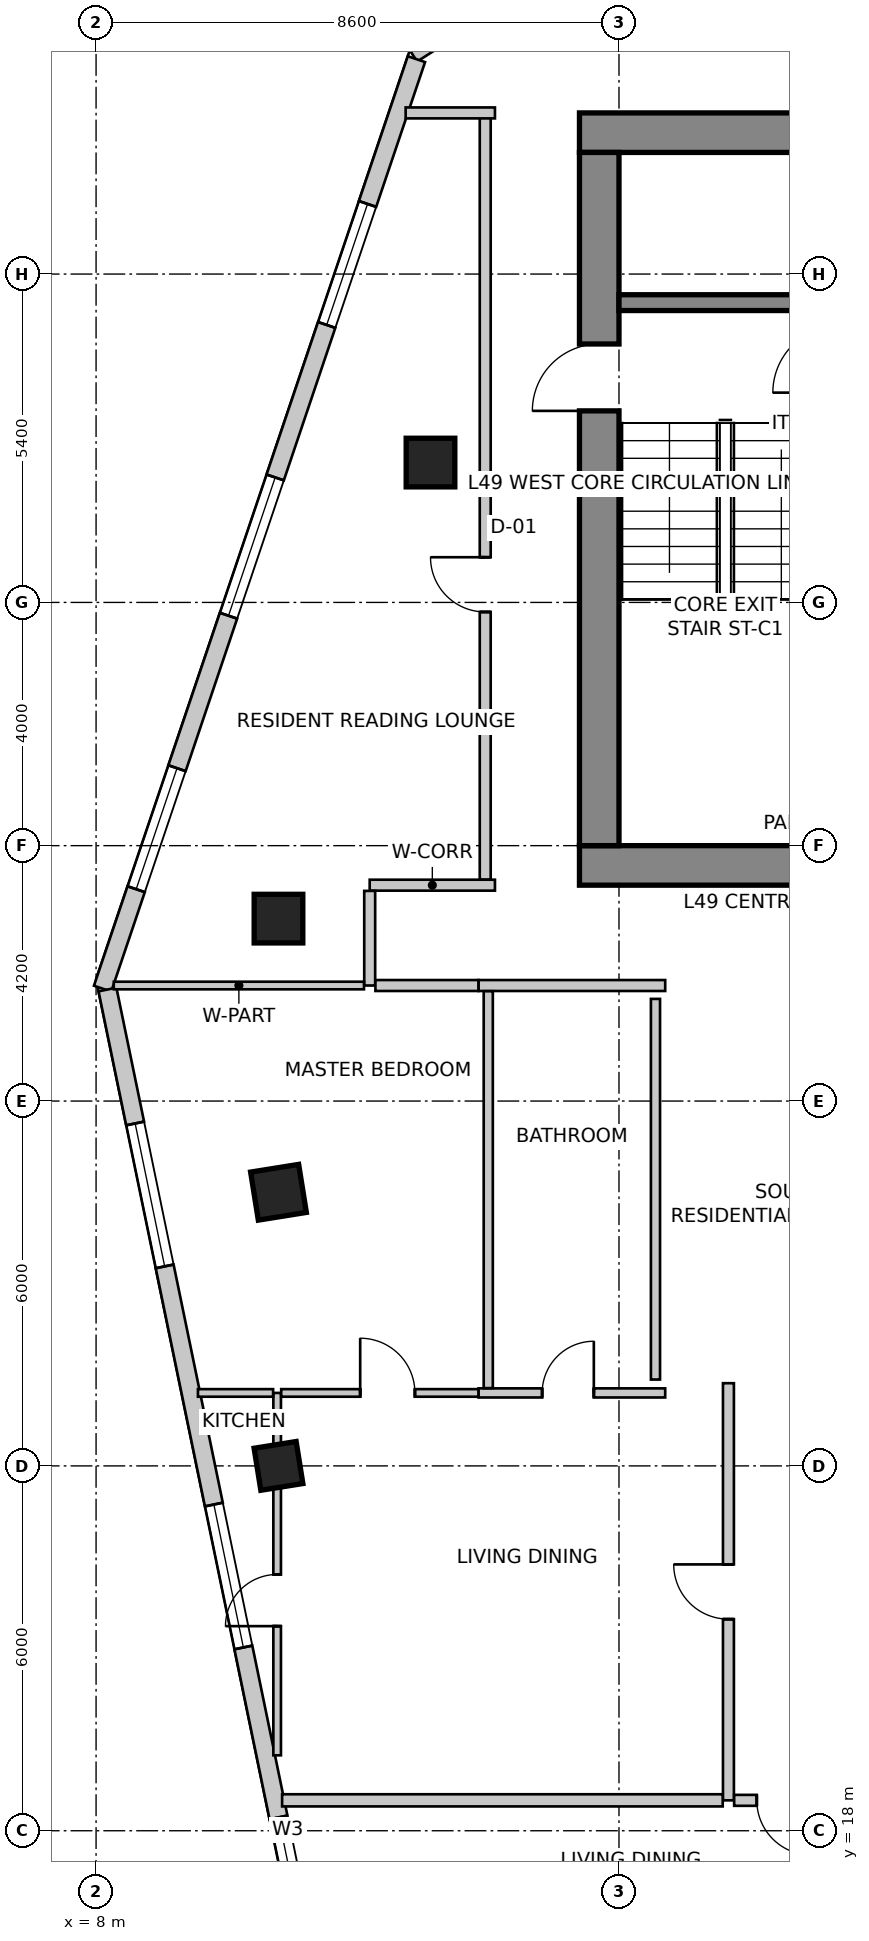
"""IFC4 building model, lengths in metres.
Left out: names, types, materials, properties, quantities, classifications, styles, units other than length and angle.
Written with IfcOpenShell. Run it as: python <this file> out.ifc"""

import sys

from ifc_helpers import new_model, si_unit, direction, frame, frame_2d, origin, origin_2d, place, context, subcontext, project, spatial, rectangle, extrude, source, transform, mapped, element, fill, save


model = new_model("IFC4")
c1 = context("Model", 3, precision=1e-05, world=origin(), true_north=direction((0.0, 1.0)))
c2 = subcontext(c1, "Body", "Model", "MODEL_VIEW")
j1 = project(units=[si_unit("LENGTHUNIT", "METRE"), si_unit("PLANEANGLEUNIT", "RADIAN")], contexts=[c1])
p1 = place(None, origin())
s1 = spatial("IfcSite", under=j1, at=p1, CompositionType="ELEMENT")
p2 = place(p1, origin())
s2 = spatial("IfcBuilding", under=s1, at=p2, CompositionType="ELEMENT")
p3 = place(p2, frame((0.0, 0.0, 197.4)))
s3 = spatial("IfcBuildingStorey", under=s2, at=p3, CompositionType="ELEMENT", Elevation=197.4)
p4 = place(p3, frame((15.95, 45.925, 0.0), z_axis=(0.0, 0.0, 1.0), x_axis=(1.0, 0.0, 0.0)))
e1 = element("IfcWall", 1, at=p4, inside=s3, PredefinedType="SHEAR", context=c2, shape_type="SweptSolid", body=[
    extrude(rectangle(XDim=15.7, YDim=0.65, at=frame_2d((7.85, 0.0))), origin(), (0.0, 0.0, 1.0), 3.5),
])
p5 = place(p3, frame((15.95, 33.875, 0.0), z_axis=(0.0, 0.0, 1.0), x_axis=(1.0, 0.0, 0.0)))
e2 = element("IfcWall", 2, at=p5, inside=s3, PredefinedType="SHEAR", context=c2, shape_type="SweptSolid", body=[
    extrude(rectangle(XDim=15.7, YDim=0.65, at=frame_2d((7.85, 0.0))), origin(), (0.0, 0.0, 1.0), 3.5),
])
m1 = source(origin(), c2, "Body", "SweptSolid", [
    extrude(rectangle(XDim=1.1, YDim=2.15, at=frame_2d((0.55, 1.075))), frame((0.0, 0.335, 0.0), z_axis=(0.0, -1.0, 0.0), x_axis=(1.0, 0.0, 0.0)), (0.0, 0.0, 1.0), 0.67),
])
p6 = place(p5, frame((10.08, 0.0, 0.0)))
e3 = element("IfcOpeningElement", 3, at=p6, cuts=e2, PredefinedType="OPENING", context=c2, shape_type="MappedRepresentation", body=[
    mapped(m1, transform((0.0, 0.0, 0.0), scale=1.0)),
])
p7 = place(p3, frame((16.275, 34.2, 0.0), z_axis=(0.0, 0.0, 1.0), x_axis=(0.0, 1.0, 0.0)))
e4 = element("IfcWall", 4, at=p7, inside=s3, PredefinedType="SHEAR", context=c2, shape_type="SweptSolid", body=[
    extrude(rectangle(XDim=11.4, YDim=0.65, at=frame_2d((5.7, 0.0))), origin(), (0.0, 0.0, 1.0), 3.5),
])
p8 = place(p7, frame((7.15, 0.0, 0.0)))
e5 = element("IfcOpeningElement", 5, at=p8, cuts=e4, PredefinedType="OPENING", context=c2, shape_type="MappedRepresentation", body=[
    mapped(m1, transform((0.0, 0.0, 0.0), scale=1.0)),
])
p9 = place(p3, frame((16.6, 43.13, 0.0), z_axis=(0.0, 0.0, 1.0), x_axis=(1.0, 0.0, 0.0)))
e6 = element("IfcWall", 6, at=p9, inside=s3, PredefinedType="SHEAR", context=c2, shape_type="SweptSolid", body=[
    extrude(rectangle(XDim=3.5, YDim=0.26, at=frame_2d((1.75, 0.0))), origin(), (0.0, 0.0, 1.0), 3.5),
])
m2 = source(origin(), c2, "Body", "SweptSolid", [
    extrude(rectangle(XDim=0.8, YDim=0.8, at=origin_2d()), origin(), (0.0, 0.0, 1.0), 3.5),
])
for number, where, z_axis, x_axis in (
    (7, (11.0, 33.0, 0.0), (0.0, 0.0, 1.0), (1.0, 0.0, 0.0)),
    (8, (13.5, 40.5, 0.0), (0.0, 0.0, 1.0), (1.0, 0.0, 0.0)),
    (9, (11.0, 28.5, 0.0), (0.0, 0.0, 1.0), (0.158, -0.987, 0.0)),
):
    element("IfcColumn", number, at=place(p3, frame(where, z_axis=z_axis, x_axis=x_axis)), inside=s3, PredefinedType="COLUMN", context=c2, shape_type="MappedRepresentation", body=[
        mapped(m2, transform((0.0, 0.0, 0.0), scale=1.0)),
    ])
m3 = source(origin(), c2, "Body", "SweptSolid", [
    extrude(rectangle(XDim=0.7, YDim=0.7, at=origin_2d()), origin(), (0.0, 0.0, 1.0), 3.5),
])
p10 = place(p3, frame((11.0, 24.0, 0.0), z_axis=(0.0, 0.0, 1.0), x_axis=(0.158158067254, -0.987413806751, 0.0)))
e10 = element("IfcColumn", 10, at=p10, inside=s3, PredefinedType="COLUMN", context=c2, shape_type="MappedRepresentation", body=[
    mapped(m3, transform((0.0, 0.0, 0.0), scale=1.0)),
])
p11 = place(p3, frame((21.875, 52.742, 0.0), z_axis=(0.0, 0.0, 1.0), x_axis=(-0.843666375448, -0.536867811419, 0.0)))
e11 = element("IfcWall", 11, at=p11, inside=s3, PredefinedType="SOLIDWALL", context=c2, shape_type="SweptSolid", body=[
    extrude(rectangle(XDim=10.284, YDim=0.3, at=frame_2d((5.142, 0.0))), origin(), (0.0, 0.0, 1.0), 3.25),
])
m4 = source(origin(), c2, "Body", "SweptSolid", [
    extrude(rectangle(XDim=2.4, YDim=2.2, at=frame_2d((1.2, 1.1))), frame((0.0, 0.16, 0.0), z_axis=(0.0, -1.0, 0.0), x_axis=(1.0, 0.0, 0.0)), (0.0, 0.0, 1.0), 0.32),
])
p12 = place(p11, frame((3.307, 0.0, 0.85)))
e12 = element("IfcOpeningElement", 12, at=p12, cuts=e11, PredefinedType="OPENING", context=c2, shape_type="MappedRepresentation", body=[
    mapped(m4, transform((0.0, 0.0, 0.0), scale=1.0)),
])
p13 = place(p3, frame((13.269, 47.134, 0.0), z_axis=(0.0, 0.0, 1.0), x_axis=(-0.319920776449, -0.947444297464, 0.0)))
e13 = element("IfcWall", 13, at=p13, inside=s3, PredefinedType="SOLIDWALL", context=c2, shape_type="SweptSolid", body=[
    extrude(rectangle(XDim=16.133, YDim=0.3, at=frame_2d((8.067, 0.0))), origin(), (0.0, 0.0, 1.0), 3.25),
])
m5 = source(origin(), c2, "Body", "SweptSolid", [
    extrude(rectangle(XDim=2.1, YDim=2.0, at=frame_2d((1.05, 1.0))), frame((0.0, 0.16, 0.0), z_axis=(0.0, -1.0, 0.0), x_axis=(1.0, 0.0, 0.0)), (0.0, 0.0, 1.0), 0.32),
])
p14 = place(p13, frame((2.513, 0.0, 0.85)))
e14 = element("IfcOpeningElement", 14, at=p14, cuts=e13, PredefinedType="OPENING", context=c2, shape_type="MappedRepresentation", body=[
    mapped(m5, transform((0.0, 0.0, 0.0), scale=1.0)),
])
p15 = place(p13, frame((7.26, 0.0, 0.85)))
e15 = element("IfcOpeningElement", 15, at=p15, cuts=e13, PredefinedType="OPENING", context=c2, shape_type="MappedRepresentation", body=[
    mapped(m4, transform((0.0, 0.0, 0.0), scale=1.0)),
])
p16 = place(p13, frame((12.307, 0.0, 0.85)))
e16 = element("IfcOpeningElement", 16, at=p16, cuts=e13, PredefinedType="OPENING", context=c2, shape_type="MappedRepresentation", body=[
    mapped(m5, transform((0.0, 0.0, 0.0), scale=1.0)),
])
p17 = place(p3, frame((8.188, 31.834, 0.0), z_axis=(0.0, 0.0, 1.0), x_axis=(0.202303475707, -0.979322880217, 0.0)))
e17 = element("IfcWall", 17, at=p17, inside=s3, PredefinedType="SOLIDWALL", context=c2, shape_type="SweptSolid", body=[
    extrude(rectangle(XDim=15.766, YDim=0.3, at=frame_2d((7.883, 0.0))), origin(), (0.0, 0.0, 1.0), 3.25),
])
p18 = place(p17, frame((2.249, 0.0, 0.85)))
e18 = element("IfcOpeningElement", 18, at=p18, cuts=e17, PredefinedType="OPENING", context=c2, shape_type="MappedRepresentation", body=[
    mapped(m4, transform((0.0, 0.0, 0.0), scale=1.0)),
])
p19 = place(p17, frame((8.648, 0.0, 0.85)))
e19 = element("IfcOpeningElement", 19, at=p19, cuts=e17, PredefinedType="OPENING", context=c2, shape_type="MappedRepresentation", body=[
    mapped(m4, transform((0.0, 0.0, 0.0), scale=1.0)),
])
m6 = source(origin(), c2, "Body", "SweptSolid", [
    extrude(rectangle(XDim=1.5, YDim=1.8, at=frame_2d((0.75, 0.9))), frame((0.0, 0.16, 0.0), z_axis=(0.0, -1.0, 0.0), x_axis=(1.0, 0.0, 0.0)), (0.0, 0.0, 1.0), 0.32),
])
p20 = place(p17, frame((13.902, 0.0, 0.85)))
e20 = element("IfcOpeningElement", 20, at=p20, cuts=e17, PredefinedType="OPENING", context=c2, shape_type="MappedRepresentation", body=[
    mapped(m6, transform((0.0, 0.0, 0.0), scale=1.0)),
])
p21 = place(p3, frame((12.5, 33.55, 0.0), z_axis=(0.0, 0.0, 1.0), x_axis=(1.0, 0.0, 0.0)))
e21 = element("IfcWall", 21, at=p21, inside=s3, PredefinedType="PARTITIONING", context=c2, shape_type="SweptSolid", body=[
    extrude(rectangle(XDim=2.06, YDim=0.18, at=frame_2d((1.03, 0.0))), origin(), (0.0, 0.0, 1.0), 3.25),
])
p22 = place(p3, frame((12.5, 31.9, 0.0), z_axis=(0.0, 0.0, 1.0), x_axis=(0.0, 1.0, 0.0)))
e22 = element("IfcWall", 22, at=p22, inside=s3, PredefinedType="PARTITIONING", context=c2, shape_type="SweptSolid", body=[
    extrude(rectangle(XDim=1.556, YDim=0.18, at=frame_2d((0.778, 0.0))), origin(), (0.0, 0.0, 1.0), 2.919),
])
p23 = place(p3, frame((17.36, 31.9, 0.0), z_axis=(0.0, 0.0, 1.0), x_axis=(-1.0, 0.0, 0.0)))
e23 = element("IfcWall", 23, at=p23, inside=s3, PredefinedType="PARTITIONING", context=c2, shape_type="SweptSolid", body=[
    extrude(rectangle(XDim=3.07, YDim=0.18, at=frame_2d((1.535, 0.0))), origin(), (0.0, 0.0, 1.0), 2.919),
])
p24 = place(p3, frame((14.288, 31.9, 0.0), z_axis=(0.0, 0.0, 1.0), x_axis=(-1.0, 0.0, 0.0)))
e24 = element("IfcWall", 24, at=p24, inside=s3, PredefinedType="PARTITIONING", context=c2, shape_type="SweptSolid", body=[
    extrude(rectangle(XDim=1.694, YDim=0.18, at=frame_2d((0.847, 0.0))), origin(), (0.0, 0.0, 1.0), 2.919),
])
p25 = place(p3, frame((14.4, 33.644, 0.0), z_axis=(0.0, 0.0, 1.0), x_axis=(0.0, 1.0, 0.0)))
e25 = element("IfcWall", 25, at=p25, inside=s3, PredefinedType="PARTITIONING", context=c2, shape_type="SweptSolid", body=[
    extrude(rectangle(XDim=12.606, YDim=0.18, at=frame_2d((6.303, 0.0))), origin(), (0.0, 0.0, 1.0), 3.25),
])
m7 = source(origin(), c2, "Body", "SweptSolid", [
    extrude(rectangle(XDim=0.9, YDim=2.15, at=frame_2d((0.45, 1.075))), frame((0.0, 0.1, 0.0), z_axis=(0.0, -1.0, 0.0), x_axis=(1.0, 0.0, 0.0)), (0.0, 0.0, 1.0), 0.2),
])
p26 = place(p25, frame((4.399, 0.0, 0.0)))
e26 = element("IfcOpeningElement", 26, at=p26, cuts=e25, PredefinedType="OPENING", context=c2, shape_type="MappedRepresentation", body=[
    mapped(m7, transform((0.0, 0.0, 0.0), scale=1.0)),
])
p27 = place(p3, frame((14.56, 46.25, 0.0), z_axis=(0.0, 0.0, 1.0), x_axis=(-1.0, 0.0, 0.0)))
e27 = element("IfcWall", 27, at=p27, inside=s3, PredefinedType="PARTITIONING", context=c2, shape_type="SweptSolid", body=[
    extrude(rectangle(XDim=1.469, YDim=0.18, at=frame_2d((0.734, 0.0))), origin(), (0.0, 0.0, 1.0), 3.25),
])
p28 = place(p3, frame((12.406, 31.9, 0.0), z_axis=(0.0, 0.0, 1.0), x_axis=(-1.0, 0.0, 0.0)))
e28 = element("IfcWall", 28, at=p28, inside=s3, PredefinedType="PARTITIONING", context=c2, shape_type="SweptSolid", body=[
    extrude(rectangle(XDim=4.115, YDim=0.125, at=frame_2d((2.057, 0.0))), origin(), (0.0, 0.0, 1.0), 2.542),
])
p29 = place(p3, frame((18.4, 18.5, 0.0), z_axis=(0.0, 0.0, 1.0), x_axis=(0.0, 1.0, 0.0)))
e29 = element("IfcWall", 29, at=p29, inside=s3, PredefinedType="PARTITIONING", context=c2, shape_type="SweptSolid", body=[
    extrude(rectangle(XDim=6.86, YDim=0.18, at=frame_2d((3.43, 0.0))), origin(), (0.0, 0.0, 1.0), 2.766),
])
p30 = place(p29, frame((2.98, 0.0, 0.0)))
e30 = element("IfcOpeningElement", 30, at=p30, cuts=e29, PredefinedType="OPENING", context=c2, shape_type="MappedRepresentation", body=[
    mapped(m7, transform((0.0, 0.0, 0.0), scale=1.0)),
])
p31 = place(p3, frame((20.2, 18.5, 0.0), z_axis=(0.0, 0.0, 1.0), x_axis=(-1.0, 0.0, 0.0)))
e31 = element("IfcWall", 31, at=p31, inside=s3, PredefinedType="PARTITIONING", context=c2, shape_type="SweptSolid", body=[
    extrude(rectangle(XDim=1.706, YDim=0.18, at=frame_2d((0.853, 0.0))), origin(), (0.0, 0.0, 1.0), 3.25),
])
p32 = place(p31, frame((0.434, 0.0, 0.0)))
e32 = element("IfcOpeningElement", 32, at=p32, cuts=e31, PredefinedType="OPENING", context=c2, shape_type="MappedRepresentation", body=[
    mapped(m7, transform((0.0, 0.0, 0.0), scale=1.0)),
])
p33 = place(p3, frame((10.978, 19.24, 0.0), z_axis=(0.0, 0.0, 1.0), x_axis=(0.0, 1.0, 0.0)))
e33 = element("IfcWall", 33, at=p33, inside=s3, PredefinedType="PARTITIONING", context=c2, shape_type="SweptSolid", body=[
    extrude(rectangle(XDim=5.96, YDim=0.125, at=frame_2d((2.98, 0.0))), origin(), (0.0, 0.0, 1.0), 2.542),
])
m8 = source(origin(), c2, "Body", "SweptSolid", [
    extrude(rectangle(XDim=0.85, YDim=2.15, at=frame_2d((0.425, 1.075))), frame((0.0, 0.073, 0.0), z_axis=(0.0, -1.0, 0.0), x_axis=(1.0, 0.0, 0.0)), (0.0, 0.0, 1.0), 0.145),
])
p34 = place(p33, frame((2.125, 0.0, 0.0)))
e34 = element("IfcOpeningElement", 34, at=p34, cuts=e33, PredefinedType="OPENING", context=c2, shape_type="MappedRepresentation", body=[
    mapped(m8, transform((0.0, 0.0, 0.0), scale=1.0)),
])
p35 = place(p3, frame((14.29, 25.2, 0.0), z_axis=(0.0, 0.0, 1.0), x_axis=(1.0, 0.0, 0.0)))
e35 = element("IfcWall", 35, at=p35, inside=s3, PredefinedType="PARTITIONING", context=c2, shape_type="SweptSolid", body=[
    extrude(rectangle(XDim=3.07, YDim=0.15, at=frame_2d((1.535, 0.0))), origin(), (0.0, 0.0, 1.0), 2.779),
])
m9 = source(origin(), c2, "Body", "SweptSolid", [
    extrude(rectangle(XDim=0.85, YDim=2.15, at=frame_2d((0.425, 1.075))), frame((0.0, 0.085, 0.0), z_axis=(0.0, -1.0, 0.0), x_axis=(1.0, 0.0, 0.0)), (0.0, 0.0, 1.0), 0.17),
])
p36 = place(p35, frame((1.046, 0.0, 0.0)))
e36 = element("IfcOpeningElement", 36, at=p36, cuts=e35, PredefinedType="OPENING", context=c2, shape_type="MappedRepresentation", body=[
    mapped(m9, transform((0.0, 0.0, 0.0), scale=1.0)),
])
p37 = place(p3, frame((11.044, 25.2, 0.0), z_axis=(0.0, 0.0, 1.0), x_axis=(1.0, 0.0, 0.0)))
e37 = element("IfcWall", 37, at=p37, inside=s3, PredefinedType="PARTITIONING", context=c2, shape_type="SweptSolid", body=[
    extrude(rectangle(XDim=3.244, YDim=0.125, at=frame_2d((1.622, 0.0))), origin(), (0.0, 0.0, 1.0), 2.542),
])
m10 = source(origin(), c2, "Body", "SweptSolid", [
    extrude(rectangle(XDim=0.9, YDim=2.15, at=frame_2d((0.45, 1.075))), frame((0.0, 0.073, 0.0), z_axis=(0.0, -1.0, 0.0), x_axis=(1.0, 0.0, 0.0)), (0.0, 0.0, 1.0), 0.145),
])
p38 = place(p37, frame((1.299, 0.0, 0.0)))
e38 = element("IfcOpeningElement", 38, at=p38, cuts=e37, PredefinedType="OPENING", context=c2, shape_type="MappedRepresentation", body=[
    mapped(m10, transform((0.0, 0.0, 0.0), scale=1.0)),
])
p39 = place(p3, frame((18.306, 18.5, 0.0), z_axis=(0.0, 0.0, 1.0), x_axis=(-1.0, 0.0, 0.0)))
e39 = element("IfcWall", 39, at=p39, inside=s3, PredefinedType="PARTITIONING", context=c2, shape_type="SweptSolid", body=[
    extrude(rectangle(XDim=7.246, YDim=0.2, at=frame_2d((3.623, 0.0))), origin(), (0.0, 0.0, 1.0), 3.25),
])
p40 = place(p3, frame((9.675, 25.2, 0.0), z_axis=(0.0, 0.0, 1.0), x_axis=(1.0, 0.0, 0.0)))
e40 = element("IfcWall", 40, at=p40, inside=s3, PredefinedType="PARTITIONING", context=c2, shape_type="SweptSolid", body=[
    extrude(rectangle(XDim=1.236, YDim=0.125, at=frame_2d((0.618, 0.0))), origin(), (0.0, 0.0, 1.0), 2.542),
])
p41 = place(p3, frame((14.45, 25.279, 0.0), z_axis=(0.0, 0.0, 1.0), x_axis=(0.0, 1.0, 0.0)))
e41 = element("IfcWall", 41, at=p41, inside=s3, PredefinedType="PARTITIONING", context=c2, shape_type="SweptSolid", body=[
    extrude(rectangle(XDim=6.527, YDim=0.15, at=frame_2d((3.263, 0.0))), origin(), (0.0, 0.0, 1.0), 2.766),
])
p42 = place(p3, frame((17.2, 31.68, 0.0), z_axis=(0.0, 0.0, 1.0), x_axis=(0.0, -1.0, 0.0)))
e42 = element("IfcWall", 42, at=p42, inside=s3, PredefinedType="PARTITIONING", context=c2, shape_type="SweptSolid", body=[
    extrude(rectangle(XDim=6.26, YDim=0.15, at=frame_2d((3.13, 0.0))), origin(), (0.0, 0.0, 1.0), 2.766),
])
m11 = source(origin(), c2, "Body", "SweptSolid", [
    extrude(rectangle(XDim=2.1, YDim=2.0, at=frame_2d((1.05, 1.0))), frame((0.0, -0.015, 0.0), z_axis=(0.0, -1.0, 0.0), x_axis=(1.0, 0.0, 0.0)), (0.0, 0.0, 1.0), 0.06),
])
p43 = place(p14, origin())
e43 = element("IfcWindow", 43, at=p43, inside=s3, PartitioningType="SINGLE_PANEL", PredefinedType="WINDOW", context=c2, shape_type="MappedRepresentation", body=[
    mapped(m11, transform((0.0, 0.0, 0.0), scale=1.0)),
])
fill(e14, e43)
m12 = source(origin(), c2, "Body", "SweptSolid", [
    extrude(rectangle(XDim=2.4, YDim=2.2, at=frame_2d((1.2, 1.1))), frame((0.0, -0.015, 0.0), z_axis=(0.0, -1.0, 0.0), x_axis=(1.0, 0.0, 0.0)), (0.0, 0.0, 1.0), 0.06),
])
p44 = place(p15, origin())
e44 = element("IfcWindow", 44, at=p44, inside=s3, PartitioningType="SINGLE_PANEL", PredefinedType="WINDOW", context=c2, shape_type="MappedRepresentation", body=[
    mapped(m12, transform((0.0, 0.0, 0.0), scale=1.0)),
])
fill(e15, e44)
p45 = place(p16, origin())
e45 = element("IfcWindow", 45, at=p45, inside=s3, PartitioningType="SINGLE_PANEL", PredefinedType="WINDOW", context=c2, shape_type="MappedRepresentation", body=[
    mapped(m11, transform((0.0, 0.0, 0.0), scale=1.0)),
])
fill(e16, e45)
p46 = place(p18, origin())
e46 = element("IfcWindow", 46, at=p46, inside=s3, PartitioningType="SINGLE_PANEL", PredefinedType="WINDOW", context=c2, shape_type="MappedRepresentation", body=[
    mapped(m12, transform((0.0, 0.0, 0.0), scale=1.0)),
])
fill(e18, e46)
p47 = place(p19, origin())
e47 = element("IfcWindow", 47, at=p47, inside=s3, PartitioningType="SINGLE_PANEL", PredefinedType="WINDOW", context=c2, shape_type="MappedRepresentation", body=[
    mapped(m12, transform((0.0, 0.0, 0.0), scale=1.0)),
])
fill(e19, e47)
m13 = source(origin(), c2, "Body", "SweptSolid", [
    extrude(rectangle(XDim=1.5, YDim=1.8, at=frame_2d((0.75, 0.9))), frame((0.0, -0.015, 0.0), z_axis=(0.0, -1.0, 0.0), x_axis=(1.0, 0.0, 0.0)), (0.0, 0.0, 1.0), 0.06),
])
p48 = place(p20, origin())
e48 = element("IfcWindow", 48, at=p48, inside=s3, PartitioningType="SINGLE_PANEL", PredefinedType="WINDOW", context=c2, shape_type="MappedRepresentation", body=[
    mapped(m13, transform((0.0, 0.0, 0.0), scale=1.0)),
])
fill(e20, e48)
m14 = source(origin(), c2, "Body", "SweptSolid", [
    extrude(rectangle(XDim=1.1, YDim=2.15, at=frame_2d((0.55, 1.075))), frame((0.0, 0.025, 0.0), z_axis=(0.0, -1.0, 0.0), x_axis=(1.0, 0.0, 0.0)), (0.0, 0.0, 1.0), 0.05),
])
p49 = place(p8, origin())
e49 = element("IfcDoor", 49, at=p49, inside=s3, OperationType="SINGLE_SWING_LEFT", PredefinedType="DOOR", context=c2, shape_type="MappedRepresentation", body=[
    mapped(m14, transform((0.0, 0.0, 0.0), scale=1.0)),
])
fill(e5, e49)
m15 = source(origin(), c2, "Body", "SweptSolid", [
    extrude(rectangle(XDim=0.9, YDim=2.15, at=frame_2d((0.45, 1.075))), frame((0.0, 0.025, 0.0), z_axis=(0.0, -1.0, 0.0), x_axis=(1.0, 0.0, 0.0)), (0.0, 0.0, 1.0), 0.05),
])
p50 = place(p26, origin())
e50 = element("IfcDoor", 50, at=p50, inside=s3, OperationType="SINGLE_SWING_RIGHT", PredefinedType="DOOR", context=c2, shape_type="MappedRepresentation", body=[
    mapped(m15, transform((0.0, 0.0, 0.0), scale=1.0)),
])
fill(e26, e50)
m16 = source(origin(), c2, "Body", "SweptSolid", [
    extrude(rectangle(XDim=0.9, YDim=2.15, at=frame_2d((0.45, 1.075))), frame((0.0, 0.025, 0.0), z_axis=(0.0, -1.0, 0.0), x_axis=(1.0, 0.0, 0.0)), (0.0, 0.0, 1.0), 0.05),
])
p51 = place(p30, origin())
e51 = element("IfcDoor", 51, at=p51, inside=s3, OperationType="SINGLE_SWING_RIGHT", PredefinedType="DOOR", context=c2, shape_type="MappedRepresentation", body=[
    mapped(m16, transform((0.0, 0.0, 0.0), scale=1.0)),
])
fill(e30, e51)
m17 = source(origin(), c2, "Body", "SweptSolid", [
    extrude(rectangle(XDim=0.85, YDim=2.15, at=frame_2d((0.425, 1.075))), frame((0.0, 0.025, 0.0), z_axis=(0.0, -1.0, 0.0), x_axis=(1.0, 0.0, 0.0)), (0.0, 0.0, 1.0), 0.05),
])
p52 = place(p34, origin())
e52 = element("IfcDoor", 52, at=p52, inside=s3, OperationType="SINGLE_SWING_LEFT", PredefinedType="DOOR", context=c2, shape_type="MappedRepresentation", body=[
    mapped(m17, transform((0.0, 0.0, 0.0), scale=1.0)),
])
fill(e34, e52)
p53 = place(p36, origin())
e53 = element("IfcDoor", 53, at=p53, inside=s3, OperationType="SINGLE_SWING_RIGHT", PredefinedType="DOOR", context=c2, shape_type="MappedRepresentation", body=[
    mapped(m17, transform((0.0, 0.0, 0.0), scale=1.0)),
])
fill(e36, e53)
p54 = place(p38, origin())
e54 = element("IfcDoor", 54, at=p54, inside=s3, OperationType="SINGLE_SWING_LEFT", PredefinedType="DOOR", context=c2, shape_type="MappedRepresentation", body=[
    mapped(m15, transform((0.0, 0.0, 0.0), scale=1.0)),
])
fill(e38, e54)
p55 = place(p32, origin())
e55 = element("IfcDoor", 55, at=p55, inside=s3, OperationType="SINGLE_SWING_LEFT", PredefinedType="DOOR", context=c2, shape_type="MappedRepresentation", body=[
    mapped(m16, transform((0.0, 0.0, 0.0), scale=1.0)),
])
fill(e32, e55)
save(model, sys.argv[1])
